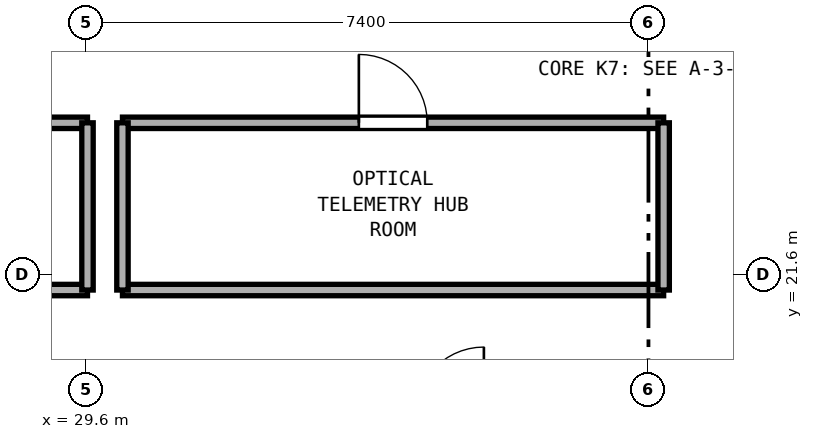
"""IFC4 building model, lengths in metres.
Left out: names, types, materials, properties, quantities, classifications, styles, units other than length and angle.
Written with IfcOpenShell. Run it as: python <this file> out.ifc"""

import sys

from ifc_helpers import new_model, si_unit, direction, frame, frame_2d, origin, place, context, subcontext, project, spatial, rectangle, extrude, element, fill, save


model = new_model("IFC4")
c1 = context("Model", 3, precision=1e-05, world=origin(), true_north=direction((0.0, 1.0)))
c2 = subcontext(c1, "Body", "Model", "MODEL_VIEW")
j1 = project(units=[si_unit("LENGTHUNIT", "METRE"), si_unit("PLANEANGLEUNIT", "RADIAN")], contexts=[c1])
p1 = place(None, origin())
s1 = spatial("IfcSite", under=j1, at=p1, CompositionType="ELEMENT")
p2 = place(p1, origin())
s2 = spatial("IfcBuilding", under=s1, at=p2, CompositionType="ELEMENT")
p3 = place(p2, frame((0.0, 0.0, 304.8)))
s3 = spatial("IfcBuildingStorey", under=s2, at=p3, CompositionType="ELEMENT", Elevation=304.8)
p4 = place(p3, frame((25.97, 21.4, 0.0), z_axis=(0.0, 0.0, 1.0), x_axis=(1.0, 0.0, 0.0)))
e1 = element("IfcWall", 1, at=p4, inside=s3, PredefinedType="PARTITIONING", context=c2, shape_type="SweptSolid", body=[
    extrude(rectangle(XDim=3.65, YDim=0.15, at=frame_2d((1.825, 0.0))), origin(), (0.0, 0.0, 1.0), 3.4),
])
p5 = place(p3, frame((25.97, 23.6, 0.0), z_axis=(0.0, 0.0, 1.0), x_axis=(1.0, 0.0, 0.0)))
e2 = element("IfcWall", 2, at=p5, inside=s3, PredefinedType="PARTITIONING", context=c2, shape_type="SweptSolid", body=[
    extrude(rectangle(XDim=3.65, YDim=0.15, at=frame_2d((1.825, 0.0))), origin(), (0.0, 0.0, 1.0), 3.4),
])
p6 = place(p5, frame((1.375, 0.0, 0.0)))
e3 = element("IfcOpeningElement", 3, at=p6, cuts=e2, PredefinedType="OPENING", context=c2, shape_type="SweptSolid", body=[
    extrude(rectangle(XDim=0.9, YDim=2.1, at=frame_2d((0.45, 1.05))), frame((0.0, 0.085, 0.0), z_axis=(0.0, -1.0, 0.0), x_axis=(1.0, 0.0, 0.0)), (0.0, 0.0, 1.0), 0.17),
])
p7 = place(p3, frame((29.62, 21.4, 0.0), z_axis=(0.0, 0.0, 1.0), x_axis=(0.0, 1.0, 0.0)))
e4 = element("IfcWall", 4, at=p7, inside=s3, PredefinedType="PARTITIONING", context=c2, shape_type="SweptSolid", body=[
    extrude(rectangle(XDim=2.2, YDim=0.15, at=frame_2d((1.1, 0.0))), origin(), (0.0, 0.0, 1.0), 3.4),
])
p8 = place(p3, frame((30.08, 21.4, 0.0), z_axis=(0.0, 0.0, 1.0), x_axis=(1.0, 0.0, 0.0)))
e5 = element("IfcWall", 5, at=p8, inside=s3, PredefinedType="PARTITIONING", context=c2, shape_type="SweptSolid", body=[
    extrude(rectangle(XDim=7.12, YDim=0.15, at=frame_2d((3.56, 0.0))), origin(), (0.0, 0.0, 1.0), 3.4),
])
p9 = place(p3, frame((30.08, 23.6, 0.0), z_axis=(0.0, 0.0, 1.0), x_axis=(1.0, 0.0, 0.0)))
e6 = element("IfcWall", 6, at=p9, inside=s3, PredefinedType="PARTITIONING", context=c2, shape_type="SweptSolid", body=[
    extrude(rectangle(XDim=7.12, YDim=0.15, at=frame_2d((3.56, 0.0))), origin(), (0.0, 0.0, 1.0), 3.4),
])
p10 = place(p9, frame((3.11, 0.0, 0.0)))
e7 = element("IfcOpeningElement", 7, at=p10, cuts=e6, PredefinedType="OPENING", context=c2, shape_type="SweptSolid", body=[
    extrude(rectangle(XDim=0.9, YDim=2.1, at=frame_2d((0.45, 1.05))), frame((0.0, 0.085, 0.0), z_axis=(0.0, -1.0, 0.0), x_axis=(1.0, 0.0, 0.0)), (0.0, 0.0, 1.0), 0.17),
])
for number, where, z_axis, x_axis in (
    (8, (30.08, 21.4, 0.0), (0.0, 0.0, 1.0), (0.0, 1.0, 0.0)),
    (9, (37.2, 21.4, 0.0), (0.0, 0.0, 1.0), (0.0, 1.0, 0.0)),
):
    element("IfcWall", number, at=place(p3, frame(where, z_axis=z_axis, x_axis=x_axis)), inside=s3, PredefinedType="PARTITIONING", context=c2, shape_type="SweptSolid", body=[
        extrude(rectangle(XDim=2.2, YDim=0.15, at=frame_2d((1.1, 0.0))), origin(), (0.0, 0.0, 1.0), 3.4),
    ])
p11 = place(p10, origin())
e10 = element("IfcDoor", 10, at=p11, inside=s3, OperationType="SINGLE_SWING_LEFT", PredefinedType="DOOR", context=c2, shape_type="SweptSolid", body=[
    extrude(rectangle(XDim=0.9, YDim=2.1, at=frame_2d((0.45, 1.05))), frame((0.0, 0.025, 0.0), z_axis=(0.0, -1.0, 0.0), x_axis=(1.0, 0.0, 0.0)), (0.0, 0.0, 1.0), 0.05),
])
fill(e7, e10)
save(model, sys.argv[1])
